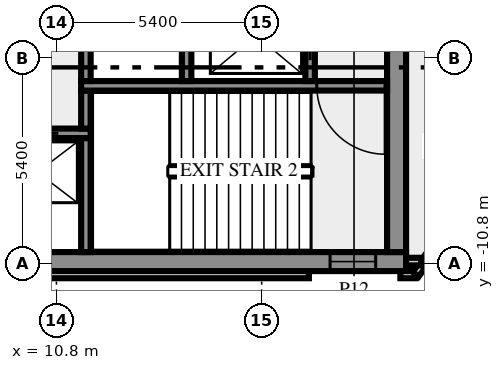
"""IFC4 building model, lengths in metres.
Left out: names, types, materials, properties, quantities, classifications, styles, units other than length and angle.
Written with IfcOpenShell. Run it as: python <this file> out.ifc"""

import sys

from ifc_helpers import new_model, si_unit, direction, frame, frame_2d, origin, place, context, subcontext, project, spatial, rectangle, extrude, element, fill, save


model = new_model("IFC4")
c1 = context("Model", 3, precision=1e-05, world=origin(), true_north=direction((0.0, 1.0)))
c2 = subcontext(c1, "Body", "Model", "MODEL_VIEW")
j1 = project(units=[si_unit("LENGTHUNIT", "METRE"), si_unit("PLANEANGLEUNIT", "RADIAN")], contexts=[c1])
p1 = place(None, origin())
s1 = spatial("IfcSite", under=j1, at=p1, CompositionType="ELEMENT")
p2 = place(p1, origin())
s2 = spatial("IfcBuilding", under=s1, at=p2, CompositionType="ELEMENT")
p3 = place(p2, frame((0.0, 0.0, 206.0)))
s3 = spatial("IfcBuildingStorey", under=s2, at=p3, CompositionType="ELEMENT", Elevation=206.0)
p4 = place(p3, frame((-17.444, -11.088, 0.0), z_axis=(0.0, 0.0, 1.0), x_axis=(1.0, 0.0, 0.0)))
e1 = element("IfcWall", 1, at=p4, inside=s3, PredefinedType="SOLIDWALL", context=c2, shape_type="SweptSolid", body=[
    extrude(rectangle(XDim=34.888, YDim=0.2, at=frame_2d((17.444, 0.0))), origin(), (0.0, 0.0, 1.0), 3.65),
])
p5 = place(p3, frame((19.85, -11.088, 0.0), z_axis=(0.0, 0.0, 1.0), x_axis=(1.0, 0.0, 0.0)))
e2 = element("IfcWall", 2, at=p5, inside=s3, PredefinedType="SOLIDWALL", context=c2, shape_type="SweptSolid", body=[
    extrude(rectangle(XDim=0.406, YDim=0.2, at=frame_2d((0.203, 0.0))), origin(), (0.0, 0.0, 1.0), 3.65),
])
p6 = place(p3, frame((20.253, -11.083, 0.0), z_axis=(0.0, 0.0, 1.0), x_axis=(0.587766567315, 0.809030569476, 0.0)))
e3 = element("IfcWall", 3, at=p6, inside=s3, PredefinedType="SOLIDWALL", context=c2, shape_type="SweptSolid", body=[
    extrude(rectangle(XDim=2.688, YDim=0.2, at=frame_2d((1.344, 0.0))), origin(), (0.0, 0.0, 1.0), 3.65),
])
p7 = place(p3, frame((19.98, -10.75, 0.0), z_axis=(0.0, 0.0, 1.0), x_axis=(1.0, 0.0, 0.0)))
e4 = element("IfcWall", 4, at=p7, inside=s3, PredefinedType="SOLIDWALL", context=c2, shape_type="SweptSolid", body=[
    extrude(rectangle(XDim=0.417, YDim=0.2, at=frame_2d((0.208, 0.0))), origin(), (0.0, 0.0, 1.0), 3.65),
])
p8 = place(p3, frame((-20.0, -10.75, 0.0), z_axis=(0.0, 0.0, 1.0), x_axis=(1.0, 0.0, 0.0)))
e5 = element("IfcWall", 5, at=p8, inside=s3, PredefinedType="SHEAR", context=c2, shape_type="SweptSolid", body=[
    extrude(rectangle(XDim=40.0, YDim=0.5, at=frame_2d((20.0, 0.0))), origin(), (0.0, 0.0, 1.0), 3.65),
])
p9 = place(p8, frame((0.8, 0.0, 1.0)))
e6 = element("IfcOpeningElement", 6, at=p9, cuts=e5, PredefinedType="OPENING", context=c2, shape_type="SweptSolid", body=[
    extrude(rectangle(XDim=1.2, YDim=1.2, at=frame_2d((0.6, 0.6))), frame((0.0, 0.26, 0.0), z_axis=(0.0, -1.0, 0.0), x_axis=(1.0, 0.0, 0.0)), (0.0, 0.0, 1.0), 0.52),
])
p10 = place(p8, frame((38.0, 0.0, 1.0)))
e7 = element("IfcOpeningElement", 7, at=p10, cuts=e5, PredefinedType="OPENING", context=c2, shape_type="SweptSolid", body=[
    extrude(rectangle(XDim=1.2, YDim=1.2, at=frame_2d((0.6, 0.6))), frame((0.0, 0.26, 0.0), z_axis=(0.0, -1.0, 0.0), x_axis=(1.0, 0.0, 0.0)), (0.0, 0.0, 1.0), 0.52),
])
p11 = place(p3, frame((11.575, -10.5, 0.0), z_axis=(0.0, 0.0, 1.0), x_axis=(0.0, 1.0, 0.0)))
e8 = element("IfcWall", 8, at=p11, inside=s3, PredefinedType="SHEAR", context=c2, shape_type="SweptSolid", body=[
    extrude(rectangle(XDim=3.0, YDim=0.25, at=frame_2d((1.5, 0.0))), origin(), (0.0, 0.0, 1.0), 3.65),
])
p12 = place(p3, frame((19.75, -10.5, 0.0), z_axis=(0.0, 0.0, 1.0), x_axis=(0.0, 1.0, 0.0)))
e9 = element("IfcWall", 9, at=p12, inside=s3, PredefinedType="SHEAR", context=c2, shape_type="SweptSolid", body=[
    extrude(rectangle(XDim=8.8, YDim=0.5, at=frame_2d((4.4, 0.0))), origin(), (0.0, 0.0, 1.0), 3.65),
])
p13 = place(p3, frame((11.7, -7.375, 0.0), z_axis=(0.0, 0.0, 1.0), x_axis=(-1.0, 0.0, 0.0)))
e10 = element("IfcWall", 10, at=p13, inside=s3, PredefinedType="SHEAR", context=c2, shape_type="SweptSolid", body=[
    extrude(rectangle(XDim=23.4, YDim=0.25, at=frame_2d((11.7, 0.0))), origin(), (0.0, 0.0, 1.0), 3.65),
])
p14 = place(p13, frame((21.312, 0.0, 0.0)))
e11 = element("IfcOpeningElement", 11, at=p14, cuts=e10, PredefinedType="OPENING", context=c2, shape_type="SweptSolid", body=[
    extrude(rectangle(XDim=0.9, YDim=2.1, at=frame_2d((0.45, 1.05))), frame((0.0, 0.135, 0.0), z_axis=(0.0, -1.0, 0.0), x_axis=(1.0, 0.0, 0.0)), (0.0, 0.0, 1.0), 0.27),
])
p15 = place(p13, frame((18.65, 0.0, 0.0)))
e12 = element("IfcOpeningElement", 12, at=p15, cuts=e10, PredefinedType="OPENING", context=c2, shape_type="SweptSolid", body=[
    extrude(rectangle(XDim=0.9, YDim=2.1, at=frame_2d((0.45, 1.05))), frame((0.0, 0.135, 0.0), z_axis=(0.0, -1.0, 0.0), x_axis=(1.0, 0.0, 0.0)), (0.0, 0.0, 1.0), 0.27),
])
p16 = place(p13, frame((16.388, 0.0, 0.0)))
e13 = element("IfcOpeningElement", 13, at=p16, cuts=e10, PredefinedType="OPENING", context=c2, shape_type="SweptSolid", body=[
    extrude(rectangle(XDim=0.9, YDim=2.1, at=frame_2d((0.45, 1.05))), frame((0.0, 0.135, 0.0), z_axis=(0.0, -1.0, 0.0), x_axis=(1.0, 0.0, 0.0)), (0.0, 0.0, 1.0), 0.27),
])
p17 = place(p13, frame((14.65, 0.0, 0.0)))
e14 = element("IfcOpeningElement", 14, at=p17, cuts=e10, PredefinedType="OPENING", context=c2, shape_type="SweptSolid", body=[
    extrude(rectangle(XDim=0.7, YDim=2.1, at=frame_2d((0.35, 1.05))), frame((0.0, 0.135, 0.0), z_axis=(0.0, -1.0, 0.0), x_axis=(1.0, 0.0, 0.0)), (0.0, 0.0, 1.0), 0.27),
])
p18 = place(p13, frame((13.35, 0.0, 0.0)))
e15 = element("IfcOpeningElement", 15, at=p18, cuts=e10, PredefinedType="OPENING", context=c2, shape_type="SweptSolid", body=[
    extrude(rectangle(XDim=0.9, YDim=2.1, at=frame_2d((0.45, 1.05))), frame((0.0, 0.135, 0.0), z_axis=(0.0, -1.0, 0.0), x_axis=(1.0, 0.0, 0.0)), (0.0, 0.0, 1.0), 0.27),
])
p19 = place(p13, frame((11.975, 0.0, 0.0)))
e16 = element("IfcOpeningElement", 16, at=p19, cuts=e10, PredefinedType="OPENING", context=c2, shape_type="SweptSolid", body=[
    extrude(rectangle(XDim=0.9, YDim=2.1, at=frame_2d((0.45, 1.05))), frame((0.0, 0.135, 0.0), z_axis=(0.0, -1.0, 0.0), x_axis=(1.0, 0.0, 0.0)), (0.0, 0.0, 1.0), 0.27),
])
p20 = place(p13, frame((10.5, 0.0, 0.0)))
e17 = element("IfcOpeningElement", 17, at=p20, cuts=e10, PredefinedType="OPENING", context=c2, shape_type="SweptSolid", body=[
    extrude(rectangle(XDim=0.9, YDim=2.1, at=frame_2d((0.45, 1.05))), frame((0.0, 0.135, 0.0), z_axis=(0.0, -1.0, 0.0), x_axis=(1.0, 0.0, 0.0)), (0.0, 0.0, 1.0), 0.27),
])
p21 = place(p13, frame((8.35, 0.0, 0.0)))
e18 = element("IfcOpeningElement", 18, at=p21, cuts=e10, PredefinedType="OPENING", context=c2, shape_type="SweptSolid", body=[
    extrude(rectangle(XDim=1.1, YDim=2.1, at=frame_2d((0.55, 1.05))), frame((0.0, 0.135, 0.0), z_axis=(0.0, -1.0, 0.0), x_axis=(1.0, 0.0, 0.0)), (0.0, 0.0, 1.0), 0.27),
])
p22 = place(p13, frame((5.85, 0.0, 0.0)))
e19 = element("IfcOpeningElement", 19, at=p22, cuts=e10, PredefinedType="OPENING", context=c2, shape_type="SweptSolid", body=[
    extrude(rectangle(XDim=1.1, YDim=2.1, at=frame_2d((0.55, 1.05))), frame((0.0, 0.135, 0.0), z_axis=(0.0, -1.0, 0.0), x_axis=(1.0, 0.0, 0.0)), (0.0, 0.0, 1.0), 0.27),
])
p23 = place(p13, frame((3.35, 0.0, 0.0)))
e20 = element("IfcOpeningElement", 20, at=p23, cuts=e10, PredefinedType="OPENING", context=c2, shape_type="SweptSolid", body=[
    extrude(rectangle(XDim=1.1, YDim=2.1, at=frame_2d((0.55, 1.05))), frame((0.0, 0.135, 0.0), z_axis=(0.0, -1.0, 0.0), x_axis=(1.0, 0.0, 0.0)), (0.0, 0.0, 1.0), 0.27),
])
p24 = place(p13, frame((0.85, 0.0, 0.0)))
e21 = element("IfcOpeningElement", 21, at=p24, cuts=e10, PredefinedType="OPENING", context=c2, shape_type="SweptSolid", body=[
    extrude(rectangle(XDim=1.1, YDim=2.1, at=frame_2d((0.55, 1.05))), frame((0.0, 0.135, 0.0), z_axis=(0.0, -1.0, 0.0), x_axis=(1.0, 0.0, 0.0)), (0.0, 0.0, 1.0), 0.27),
])
p25 = place(p3, frame((11.575, -7.25, 0.0), z_axis=(0.0, 0.0, 1.0), x_axis=(0.0, 1.0, 0.0)))
e22 = element("IfcWall", 22, at=p25, inside=s3, PredefinedType="SHEAR", context=c2, shape_type="SweptSolid", body=[
    extrude(rectangle(XDim=1.0, YDim=0.25, at=frame_2d((0.5, 0.0))), origin(), (0.0, 0.0, 1.0), 3.65),
])
p26 = place(p3, frame((19.5, -6.125, 0.0), z_axis=(0.0, 0.0, 1.0), x_axis=(-1.0, 0.0, 0.0)))
e23 = element("IfcWall", 23, at=p26, inside=s3, PredefinedType="SHEAR", context=c2, shape_type="SweptSolid", body=[
    extrude(rectangle(XDim=8.05, YDim=0.25, at=frame_2d((4.025, 0.0))), origin(), (0.0, 0.0, 1.0), 3.65),
])
p27 = place(p26, frame((0.05, 0.0, 0.0)))
e24 = element("IfcOpeningElement", 24, at=p27, cuts=e23, PredefinedType="OPENING", context=c2, shape_type="SweptSolid", body=[
    extrude(rectangle(XDim=1.8, YDim=2.1, at=frame_2d((0.9, 1.05))), frame((0.0, 0.135, 0.0), z_axis=(0.0, -1.0, 0.0), x_axis=(1.0, 0.0, 0.0)), (0.0, 0.0, 1.0), 0.27),
])
p28 = place(p3, frame((11.575, -6.0, 0.0), z_axis=(0.0, 0.0, 1.0), x_axis=(0.0, 1.0, 0.0)))
e25 = element("IfcWall", 25, at=p28, inside=s3, PredefinedType="SHEAR", context=c2, shape_type="SweptSolid", body=[
    extrude(rectangle(XDim=1.75, YDim=0.25, at=frame_2d((0.875, 0.0))), origin(), (0.0, 0.0, 1.0), 3.65),
])
p29 = place(p3, frame((14.225, -6.0, 0.0), z_axis=(0.0, 0.0, 1.0), x_axis=(0.0, 1.0, 0.0)))
e26 = element("IfcWall", 26, at=p29, inside=s3, PredefinedType="SHEAR", context=c2, shape_type="SweptSolid", body=[
    extrude(rectangle(XDim=4.3, YDim=0.25, at=frame_2d((2.15, 0.0))), origin(), (0.0, 0.0, 1.0), 3.65),
])
p30 = place(p3, frame((17.475, -6.0, 0.0), z_axis=(0.0, 0.0, 1.0), x_axis=(0.0, 1.0, 0.0)))
e27 = element("IfcWall", 27, at=p30, inside=s3, PredefinedType="SHEAR", context=c2, shape_type="SweptSolid", body=[
    extrude(rectangle(XDim=4.3, YDim=0.25, at=frame_2d((2.15, 0.0))), origin(), (0.0, 0.0, 1.0), 3.65),
])
p31 = place(p30, frame((0.55, 0.0, 0.0)))
e28 = element("IfcOpeningElement", 28, at=p31, cuts=e27, PredefinedType="OPENING", context=c2, shape_type="SweptSolid", body=[
    extrude(rectangle(XDim=1.3, YDim=2.1, at=frame_2d((0.65, 1.05))), frame((0.0, 0.135, 0.0), z_axis=(0.0, -1.0, 0.0), x_axis=(1.0, 0.0, 0.0)), (0.0, 0.0, 1.0), 0.27),
])
p32 = place(p10, origin())
e29 = element("IfcWindow", 29, at=p32, inside=s3, PartitioningType="SINGLE_PANEL", PredefinedType="WINDOW", context=c2, shape_type="SweptSolid", body=[
    extrude(rectangle(XDim=1.2, YDim=1.2, at=frame_2d((0.6, 0.6))), frame((0.0, 0.03, 0.0), z_axis=(0.0, -1.0, 0.0), x_axis=(1.0, 0.0, 0.0)), (0.0, 0.0, 1.0), 0.06),
])
fill(e7, e29)
p33 = place(p24, origin())
e30 = element("IfcDoor", 30, at=p33, inside=s3, OperationType="DOUBLE_DOOR_SLIDING", PredefinedType="DOOR", context=c2, shape_type="SweptSolid", body=[
    extrude(rectangle(XDim=1.1, YDim=2.1, at=frame_2d((0.55, 1.05))), frame((0.0, 0.025, 0.0), z_axis=(0.0, -1.0, 0.0), x_axis=(1.0, 0.0, 0.0)), (0.0, 0.0, 1.0), 0.05),
])
fill(e21, e30)
p34 = place(p27, origin())
e31 = element("IfcDoor", 31, at=p34, inside=s3, OperationType="DOUBLE_DOOR_SINGLE_SWING", PredefinedType="DOOR", context=c2, shape_type="SweptSolid", body=[
    extrude(rectangle(XDim=1.8, YDim=2.1, at=frame_2d((0.9, 1.05))), frame((0.0, 0.025, 0.0), z_axis=(0.0, -1.0, 0.0), x_axis=(1.0, 0.0, 0.0)), (0.0, 0.0, 1.0), 0.05),
])
fill(e24, e31)
p35 = place(p31, origin())
e32 = element("IfcDoor", 32, at=p35, inside=s3, OperationType="DOUBLE_DOOR_SLIDING", PredefinedType="DOOR", context=c2, shape_type="SweptSolid", body=[
    extrude(rectangle(XDim=1.3, YDim=2.1, at=frame_2d((0.65, 1.05))), frame((0.0, 0.025, 0.0), z_axis=(0.0, -1.0, 0.0), x_axis=(1.0, 0.0, 0.0)), (0.0, 0.0, 1.0), 0.05),
])
fill(e28, e32)
save(model, sys.argv[1])
